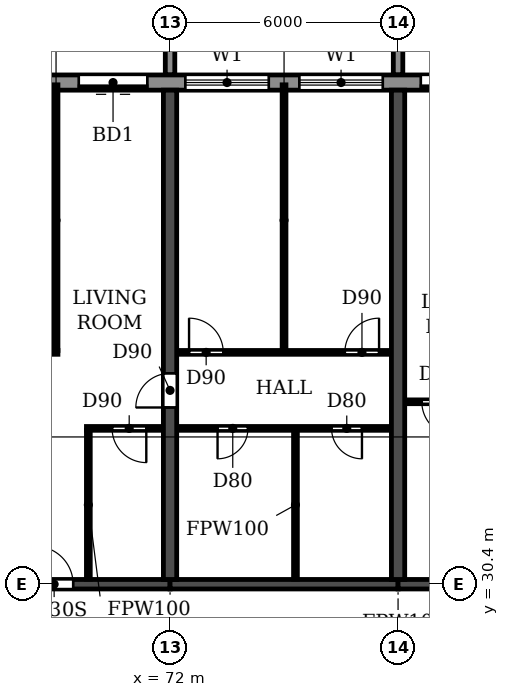
"""IFC4 building model, lengths in metres.
Left out: names, types, materials, properties, quantities, classifications, styles, units other than length and angle.
Written with IfcOpenShell. Run it as: python <this file> out.ifc"""

import sys

from ifc_helpers import new_model, si_unit, direction, frame, frame_2d, origin, place, context, subcontext, project, spatial, polyline, rectangle, outline, extrude, source, transform, mapped, element, fill, save


model = new_model("IFC4")
c1 = context("Model", 3, precision=1e-05, world=origin(), true_north=direction((0.0, 1.0)))
c2 = subcontext(c1, "Body", "Model", "MODEL_VIEW")
j1 = project(units=[si_unit("LENGTHUNIT", "METRE"), si_unit("PLANEANGLEUNIT", "RADIAN")], contexts=[c1])
p1 = place(None, origin())
s1 = spatial("IfcSite", under=j1, at=p1, CompositionType="ELEMENT")
p2 = place(p1, origin())
s2 = spatial("IfcBuilding", under=s1, at=p2, CompositionType="ELEMENT")
p3 = place(p2, frame((0.0, 0.0, 112.5)))
s3 = spatial("IfcBuildingStorey", under=s2, at=p3, CompositionType="ELEMENT", Elevation=112.5)
p4 = place(p3, frame((72.0, 30.525, 0.0), z_axis=(0.0, 0.0, 1.0), x_axis=(0.0, 1.0, 0.0)))
e1 = element("IfcWall", 1, at=p4, inside=s3, PredefinedType="SHEAR", context=c2, shape_type="SweptSolid", body=[
    extrude(rectangle(XDim=12.875, YDim=0.35, at=frame_2d((6.438, 0.0))), origin(), (0.0, 0.0, 1.0), 2.95),
])
p5 = place(p4, frame((4.525, 0.0, 0.0)))
e2 = element("IfcOpeningElement", 2, at=p5, cuts=e1, PredefinedType="OPENING", context=c2, shape_type="SweptSolid", body=[
    extrude(rectangle(XDim=0.9, YDim=2.1, at=frame_2d((0.45, 1.05))), frame((0.0, 0.185, 0.0), z_axis=(0.0, -1.0, 0.0), x_axis=(1.0, 0.0, 0.0)), (0.0, 0.0, 1.0), 0.37),
])
p6 = place(p3, frame((78.0, 30.525, 0.0), z_axis=(0.0, 0.0, 1.0), x_axis=(0.0, 1.0, 0.0)))
e3 = element("IfcWall", 3, at=p6, inside=s3, PredefinedType="SHEAR", context=c2, shape_type="SweptSolid", body=[
    extrude(rectangle(XDim=12.875, YDim=0.35, at=frame_2d((6.438, 0.0))), origin(), (0.0, 0.0, 1.0), 2.95),
])
p7 = place(p3, frame((66.0, 30.4, 0.0), z_axis=(0.0, 0.0, 1.0), x_axis=(1.0, 0.0, 0.0)))
e4 = element("IfcWall", 4, at=p7, inside=s3, PredefinedType="SHEAR", context=c2, shape_type="SweptSolid", body=[
    extrude(rectangle(XDim=6.0, YDim=0.25, at=frame_2d((3.0, 0.0))), origin(), (0.0, 0.0, 1.0), 2.35),
])
p8 = place(p7, frame((2.45, 0.0, 0.0)))
e5 = element("IfcOpeningElement", 5, at=p8, cuts=e4, PredefinedType="OPENING", context=c2, shape_type="SweptSolid", body=[
    extrude(rectangle(XDim=1.0, YDim=2.1, at=frame_2d((0.5, 1.05))), frame((0.0, 0.135, 0.0), z_axis=(0.0, -1.0, 0.0), x_axis=(1.0, 0.0, 0.0)), (0.0, 0.0, 1.0), 0.27),
])
p9 = place(p3, frame((72.0, 30.4, 0.0), z_axis=(0.0, 0.0, 1.0), x_axis=(1.0, 0.0, 0.0)))
e6 = element("IfcWall", 6, at=p9, inside=s3, PredefinedType="SHEAR", context=c2, shape_type="SweptSolid", body=[
    extrude(rectangle(XDim=6.0, YDim=0.25, at=frame_2d((3.0, 0.0))), origin(), (0.0, 0.0, 1.0), 2.35),
])
p10 = place(p3, frame((78.0, 30.4, 0.0), z_axis=(0.0, 0.0, 1.0), x_axis=(1.0, 0.0, 0.0)))
e7 = element("IfcWall", 7, at=p10, inside=s3, PredefinedType="SHEAR", context=c2, shape_type="SweptSolid", body=[
    extrude(rectangle(XDim=6.0, YDim=0.25, at=frame_2d((3.0, 0.0))), origin(), (0.0, 0.0, 1.0), 2.35),
])
p11 = place(p10, frame((2.55, 0.0, 0.0)))
e8 = element("IfcOpeningElement", 8, at=p11, cuts=e7, PredefinedType="OPENING", context=c2, shape_type="SweptSolid", body=[
    extrude(rectangle(XDim=1.0, YDim=2.1, at=frame_2d((0.5, 1.05))), frame((0.0, 0.135, 0.0), z_axis=(0.0, -1.0, 0.0), x_axis=(1.0, 0.0, 0.0)), (0.0, 0.0, 1.0), 0.27),
])
p12 = place(p3, frame((85.317, 43.6, 0.0), z_axis=(0.0, 0.0, 1.0), x_axis=(-1.0, 0.0, 0.0)))
e9 = element("IfcWall", 9, at=p12, inside=s3, PredefinedType="STANDARD", context=c2, shape_type="SweptSolid", body=[
    extrude(rectangle(XDim=68.634, YDim=0.4, at=frame_2d((34.317, 0.0))), origin(), (0.0, 0.0, 1.0), 2.95),
])
p13 = place(p12, frame((64.917, 0.0, 0.0)))
e10 = element("IfcOpeningElement", 10, at=p13, cuts=e9, PredefinedType="OPENING", context=c2, shape_type="SweptSolid", body=[
    extrude(rectangle(XDim=1.8, YDim=2.4, at=frame_2d((0.9, 1.2))), frame((0.0, 0.21, 0.0), z_axis=(0.0, -1.0, 0.0), x_axis=(1.0, 0.0, 0.0)), (0.0, 0.0, 1.0), 0.42),
])
p14 = place(p12, frame((61.717, 0.0, 0.9)))
e11 = element("IfcOpeningElement", 11, at=p14, cuts=e9, PredefinedType="OPENING", context=c2, shape_type="SweptSolid", body=[
    extrude(rectangle(XDim=2.2, YDim=1.5, at=frame_2d((1.1, 0.75))), frame((0.0, 0.21, 0.0), z_axis=(0.0, -1.0, 0.0), x_axis=(1.0, 0.0, 0.0)), (0.0, 0.0, 1.0), 0.42),
])
p15 = place(p12, frame((58.717, 0.0, 0.9)))
e12 = element("IfcOpeningElement", 12, at=p15, cuts=e9, PredefinedType="OPENING", context=c2, shape_type="SweptSolid", body=[
    extrude(rectangle(XDim=2.2, YDim=1.5, at=frame_2d((1.1, 0.75))), frame((0.0, 0.21, 0.0), z_axis=(0.0, -1.0, 0.0), x_axis=(1.0, 0.0, 0.0)), (0.0, 0.0, 1.0), 0.42),
])
p16 = place(p12, frame((55.917, 0.0, 0.0)))
e13 = element("IfcOpeningElement", 13, at=p16, cuts=e9, PredefinedType="OPENING", context=c2, shape_type="SweptSolid", body=[
    extrude(rectangle(XDim=1.8, YDim=2.4, at=frame_2d((0.9, 1.2))), frame((0.0, 0.21, 0.0), z_axis=(0.0, -1.0, 0.0), x_axis=(1.0, 0.0, 0.0)), (0.0, 0.0, 1.0), 0.42),
])
p17 = place(p12, frame((52.917, 0.0, 0.0)))
e14 = element("IfcOpeningElement", 14, at=p17, cuts=e9, PredefinedType="OPENING", context=c2, shape_type="SweptSolid", body=[
    extrude(rectangle(XDim=1.8, YDim=2.4, at=frame_2d((0.9, 1.2))), frame((0.0, 0.21, 0.0), z_axis=(0.0, -1.0, 0.0), x_axis=(1.0, 0.0, 0.0)), (0.0, 0.0, 1.0), 0.42),
])
p18 = place(p12, frame((49.717, 0.0, 0.9)))
e15 = element("IfcOpeningElement", 15, at=p18, cuts=e9, PredefinedType="OPENING", context=c2, shape_type="SweptSolid", body=[
    extrude(rectangle(XDim=2.2, YDim=1.5, at=frame_2d((1.1, 0.75))), frame((0.0, 0.21, 0.0), z_axis=(0.0, -1.0, 0.0), x_axis=(1.0, 0.0, 0.0)), (0.0, 0.0, 1.0), 0.42),
])
p19 = place(p12, frame((46.717, 0.0, 0.9)))
e16 = element("IfcOpeningElement", 16, at=p19, cuts=e9, PredefinedType="OPENING", context=c2, shape_type="SweptSolid", body=[
    extrude(rectangle(XDim=2.2, YDim=1.5, at=frame_2d((1.1, 0.75))), frame((0.0, 0.21, 0.0), z_axis=(0.0, -1.0, 0.0), x_axis=(1.0, 0.0, 0.0)), (0.0, 0.0, 1.0), 0.42),
])
p20 = place(p12, frame((43.917, 0.0, 0.0)))
e17 = element("IfcOpeningElement", 17, at=p20, cuts=e9, PredefinedType="OPENING", context=c2, shape_type="SweptSolid", body=[
    extrude(rectangle(XDim=1.8, YDim=2.4, at=frame_2d((0.9, 1.2))), frame((0.0, 0.21, 0.0), z_axis=(0.0, -1.0, 0.0), x_axis=(1.0, 0.0, 0.0)), (0.0, 0.0, 1.0), 0.42),
])
p21 = place(p12, frame((40.717, 0.0, 0.9)))
e18 = element("IfcOpeningElement", 18, at=p21, cuts=e9, PredefinedType="OPENING", context=c2, shape_type="SweptSolid", body=[
    extrude(rectangle(XDim=2.2, YDim=1.5, at=frame_2d((1.1, 0.75))), frame((0.0, 0.21, 0.0), z_axis=(0.0, -1.0, 0.0), x_axis=(1.0, 0.0, 0.0)), (0.0, 0.0, 1.0), 0.42),
])
p22 = place(p12, frame((37.717, 0.0, 0.9)))
e19 = element("IfcOpeningElement", 19, at=p22, cuts=e9, PredefinedType="OPENING", context=c2, shape_type="SweptSolid", body=[
    extrude(rectangle(XDim=2.2, YDim=1.5, at=frame_2d((1.1, 0.75))), frame((0.0, 0.21, 0.0), z_axis=(0.0, -1.0, 0.0), x_axis=(1.0, 0.0, 0.0)), (0.0, 0.0, 1.0), 0.42),
])
p23 = place(p12, frame((34.917, 0.0, 0.0)))
e20 = element("IfcOpeningElement", 20, at=p23, cuts=e9, PredefinedType="OPENING", context=c2, shape_type="SweptSolid", body=[
    extrude(rectangle(XDim=1.8, YDim=2.4, at=frame_2d((0.9, 1.2))), frame((0.0, 0.21, 0.0), z_axis=(0.0, -1.0, 0.0), x_axis=(1.0, 0.0, 0.0)), (0.0, 0.0, 1.0), 0.42),
])
p24 = place(p12, frame((31.717, 0.0, 0.9)))
e21 = element("IfcOpeningElement", 21, at=p24, cuts=e9, PredefinedType="OPENING", context=c2, shape_type="SweptSolid", body=[
    extrude(rectangle(XDim=2.2, YDim=1.5, at=frame_2d((1.1, 0.75))), frame((0.0, 0.21, 0.0), z_axis=(0.0, -1.0, 0.0), x_axis=(1.0, 0.0, 0.0)), (0.0, 0.0, 1.0), 0.42),
])
p25 = place(p12, frame((28.917, 0.0, 0.0)))
e22 = element("IfcOpeningElement", 22, at=p25, cuts=e9, PredefinedType="OPENING", context=c2, shape_type="SweptSolid", body=[
    extrude(rectangle(XDim=1.8, YDim=2.4, at=frame_2d((0.9, 1.2))), frame((0.0, 0.21, 0.0), z_axis=(0.0, -1.0, 0.0), x_axis=(1.0, 0.0, 0.0)), (0.0, 0.0, 1.0), 0.42),
])
p26 = place(p12, frame((25.717, 0.0, 0.9)))
e23 = element("IfcOpeningElement", 23, at=p26, cuts=e9, PredefinedType="OPENING", context=c2, shape_type="SweptSolid", body=[
    extrude(rectangle(XDim=2.2, YDim=1.5, at=frame_2d((1.1, 0.75))), frame((0.0, 0.21, 0.0), z_axis=(0.0, -1.0, 0.0), x_axis=(1.0, 0.0, 0.0)), (0.0, 0.0, 1.0), 0.42),
])
p27 = place(p12, frame((22.717, 0.0, 0.9)))
e24 = element("IfcOpeningElement", 24, at=p27, cuts=e9, PredefinedType="OPENING", context=c2, shape_type="SweptSolid", body=[
    extrude(rectangle(XDim=2.2, YDim=1.5, at=frame_2d((1.1, 0.75))), frame((0.0, 0.21, 0.0), z_axis=(0.0, -1.0, 0.0), x_axis=(1.0, 0.0, 0.0)), (0.0, 0.0, 1.0), 0.42),
])
p28 = place(p12, frame((19.917, 0.0, 0.0)))
e25 = element("IfcOpeningElement", 25, at=p28, cuts=e9, PredefinedType="OPENING", context=c2, shape_type="SweptSolid", body=[
    extrude(rectangle(XDim=1.8, YDim=2.4, at=frame_2d((0.9, 1.2))), frame((0.0, 0.21, 0.0), z_axis=(0.0, -1.0, 0.0), x_axis=(1.0, 0.0, 0.0)), (0.0, 0.0, 1.0), 0.42),
])
p29 = place(p12, frame((16.717, 0.0, 0.9)))
e26 = element("IfcOpeningElement", 26, at=p29, cuts=e9, PredefinedType="OPENING", context=c2, shape_type="SweptSolid", body=[
    extrude(rectangle(XDim=2.2, YDim=1.5, at=frame_2d((1.1, 0.75))), frame((0.0, 0.21, 0.0), z_axis=(0.0, -1.0, 0.0), x_axis=(1.0, 0.0, 0.0)), (0.0, 0.0, 1.0), 0.42),
])
p30 = place(p12, frame((13.917, 0.0, 0.0)))
e27 = element("IfcOpeningElement", 27, at=p30, cuts=e9, PredefinedType="OPENING", context=c2, shape_type="SweptSolid", body=[
    extrude(rectangle(XDim=1.8, YDim=2.4, at=frame_2d((0.9, 1.2))), frame((0.0, 0.21, 0.0), z_axis=(0.0, -1.0, 0.0), x_axis=(1.0, 0.0, 0.0)), (0.0, 0.0, 1.0), 0.42),
])
p31 = place(p12, frame((10.717, 0.0, 0.9)))
e28 = element("IfcOpeningElement", 28, at=p31, cuts=e9, PredefinedType="OPENING", context=c2, shape_type="SweptSolid", body=[
    extrude(rectangle(XDim=2.2, YDim=1.5, at=frame_2d((1.1, 0.75))), frame((0.0, 0.21, 0.0), z_axis=(0.0, -1.0, 0.0), x_axis=(1.0, 0.0, 0.0)), (0.0, 0.0, 1.0), 0.42),
])
p32 = place(p12, frame((7.717, 0.0, 0.9)))
e29 = element("IfcOpeningElement", 29, at=p32, cuts=e9, PredefinedType="OPENING", context=c2, shape_type="SweptSolid", body=[
    extrude(rectangle(XDim=2.2, YDim=1.5, at=frame_2d((1.1, 0.75))), frame((0.0, 0.21, 0.0), z_axis=(0.0, -1.0, 0.0), x_axis=(1.0, 0.0, 0.0)), (0.0, 0.0, 1.0), 0.42),
])
p33 = place(p12, frame((4.917, 0.0, 0.0)))
e30 = element("IfcOpeningElement", 30, at=p33, cuts=e9, PredefinedType="OPENING", context=c2, shape_type="SweptSolid", body=[
    extrude(rectangle(XDim=1.8, YDim=2.4, at=frame_2d((0.9, 1.2))), frame((0.0, 0.21, 0.0), z_axis=(0.0, -1.0, 0.0), x_axis=(1.0, 0.0, 0.0)), (0.0, 0.0, 1.0), 0.42),
])
p34 = place(p12, frame((1.717, 0.0, 0.9)))
e31 = element("IfcOpeningElement", 31, at=p34, cuts=e9, PredefinedType="OPENING", context=c2, shape_type="SweptSolid", body=[
    extrude(rectangle(XDim=2.2, YDim=1.5, at=frame_2d((1.1, 0.75))), frame((0.0, 0.21, 0.0), z_axis=(0.0, -1.0, 0.0), x_axis=(1.0, 0.0, 0.0)), (0.0, 0.0, 1.0), 0.42),
])
m1 = source(origin(), c2, "Body", "SweptSolid", [
    extrude(outline(polyline([(0.0, 0.0), (0.25, 0.0), (0.25, 3.1), (0.0, 3.1), (0.0, 0.0)])), origin(), (0.0, 0.0, 1.0), 3.1),
])
for number, where in (
    (32, (71.875, 43.8, 0.0)),
    (33, (77.875, 43.8, 0.0)),
):
    element("IfcWall", number, at=place(p3, frame(where)), inside=s3, PredefinedType="STANDARD", context=c2, shape_type="MappedRepresentation", body=[
        mapped(m1, transform((0.0, 0.0, 0.0))),
    ])
p35 = place(p3, frame((69.8, 34.5, 0.0), z_axis=(0.0, 0.0, 1.0), x_axis=(1.0, 0.0, 0.0)))
e34 = element("IfcWall", 34, at=p35, inside=s3, PredefinedType="PARTITIONING", context=c2, shape_type="SweptSolid", body=[
    extrude(rectangle(XDim=2.015, YDim=0.1, at=frame_2d((1.007, 0.0))), origin(), (0.0, 0.0, 1.0), 2.95),
])
p36 = place(p35, frame((0.675, 0.0, 0.0)))
e35 = element("IfcOpeningElement", 35, at=p36, cuts=e34, PredefinedType="OPENING", context=c2, shape_type="SweptSolid", body=[
    extrude(rectangle(XDim=0.9, YDim=2.1, at=frame_2d((0.45, 1.05))), frame((0.0, 0.06, 0.0), z_axis=(0.0, -1.0, 0.0), x_axis=(1.0, 0.0, 0.0)), (0.0, 0.0, 1.0), 0.12),
])
p37 = place(p3, frame((72.185, 34.5, 0.0), z_axis=(0.0, 0.0, 1.0), x_axis=(1.0, 0.0, 0.0)))
e36 = element("IfcWall", 36, at=p37, inside=s3, PredefinedType="PARTITIONING", context=c2, shape_type="SweptSolid", body=[
    extrude(rectangle(XDim=5.63, YDim=0.1, at=frame_2d((2.815, 0.0))), origin(), (0.0, 0.0, 1.0), 2.95),
])
p38 = place(p37, frame((1.065, 0.0, 0.0)))
e37 = element("IfcOpeningElement", 37, at=p38, cuts=e36, PredefinedType="OPENING", context=c2, shape_type="SweptSolid", body=[
    extrude(rectangle(XDim=0.8, YDim=2.1, at=frame_2d((0.4, 1.05))), frame((0.0, 0.06, 0.0), z_axis=(0.0, -1.0, 0.0), x_axis=(1.0, 0.0, 0.0)), (0.0, 0.0, 1.0), 0.12),
])
p39 = place(p37, frame((4.065, 0.0, 0.0)))
e38 = element("IfcOpeningElement", 38, at=p39, cuts=e36, PredefinedType="OPENING", context=c2, shape_type="SweptSolid", body=[
    extrude(rectangle(XDim=0.8, YDim=2.1, at=frame_2d((0.4, 1.05))), frame((0.0, 0.06, 0.0), z_axis=(0.0, -1.0, 0.0), x_axis=(1.0, 0.0, 0.0)), (0.0, 0.0, 1.0), 0.12),
])
p40 = place(p3, frame((78.185, 35.2, 0.0), z_axis=(0.0, 0.0, 1.0), x_axis=(1.0, 0.0, 0.0)))
e39 = element("IfcWall", 39, at=p40, inside=s3, PredefinedType="PARTITIONING", context=c2, shape_type="SweptSolid", body=[
    extrude(rectangle(XDim=2.015, YDim=0.1, at=frame_2d((1.007, 0.0))), origin(), (0.0, 0.0, 1.0), 2.95),
])
p41 = place(p40, frame((0.44, 0.0, 0.0)))
e40 = element("IfcOpeningElement", 40, at=p41, cuts=e39, PredefinedType="OPENING", context=c2, shape_type="SweptSolid", body=[
    extrude(rectangle(XDim=0.9, YDim=2.1, at=frame_2d((0.45, 1.05))), frame((0.0, 0.06, 0.0), z_axis=(0.0, -1.0, 0.0), x_axis=(1.0, 0.0, 0.0)), (0.0, 0.0, 1.0), 0.12),
])
p42 = place(p3, frame((66.185, 36.5, 0.0), z_axis=(0.0, 0.0, 1.0), x_axis=(1.0, 0.0, 0.0)))
e41 = element("IfcWall", 41, at=p42, inside=s3, PredefinedType="PARTITIONING", context=c2, shape_type="SweptSolid", body=[
    extrude(rectangle(XDim=2.865, YDim=0.1, at=frame_2d((1.433, 0.0))), origin(), (0.0, 0.0, 1.0), 2.95),
])
p43 = place(p42, frame((0.315, 0.0, 0.0)))
e42 = element("IfcOpeningElement", 42, at=p43, cuts=e41, PredefinedType="OPENING", context=c2, shape_type="SweptSolid", body=[
    extrude(rectangle(XDim=0.9, YDim=2.1, at=frame_2d((0.45, 1.05))), frame((0.0, 0.06, 0.0), z_axis=(0.0, -1.0, 0.0), x_axis=(1.0, 0.0, 0.0)), (0.0, 0.0, 1.0), 0.12),
])
p44 = place(p3, frame((72.185, 36.5, 0.0), z_axis=(0.0, 0.0, 1.0), x_axis=(1.0, 0.0, 0.0)))
e43 = element("IfcWall", 43, at=p44, inside=s3, PredefinedType="PARTITIONING", context=c2, shape_type="SweptSolid", body=[
    extrude(rectangle(XDim=5.63, YDim=0.1, at=frame_2d((2.815, 0.0))), origin(), (0.0, 0.0, 1.0), 2.95),
])
p45 = place(p44, frame((0.315, 0.0, 0.0)))
e44 = element("IfcOpeningElement", 44, at=p45, cuts=e43, PredefinedType="OPENING", context=c2, shape_type="SweptSolid", body=[
    extrude(rectangle(XDim=0.9, YDim=2.1, at=frame_2d((0.45, 1.05))), frame((0.0, 0.06, 0.0), z_axis=(0.0, -1.0, 0.0), x_axis=(1.0, 0.0, 0.0)), (0.0, 0.0, 1.0), 0.12),
])
p46 = place(p44, frame((4.415, 0.0, 0.0)))
e45 = element("IfcOpeningElement", 45, at=p46, cuts=e43, PredefinedType="OPENING", context=c2, shape_type="SweptSolid", body=[
    extrude(rectangle(XDim=0.9, YDim=2.1, at=frame_2d((0.45, 1.05))), frame((0.0, 0.06, 0.0), z_axis=(0.0, -1.0, 0.0), x_axis=(1.0, 0.0, 0.0)), (0.0, 0.0, 1.0), 0.12),
])
p47 = place(p3, frame((69.0, 36.55, 0.0), z_axis=(0.0, 0.0, 1.0), x_axis=(0.0, 1.0, 0.0)))
e46 = element("IfcWall", 46, at=p47, inside=s3, PredefinedType="PARTITIONING", context=c2, shape_type="SweptSolid", body=[
    extrude(rectangle(XDim=6.99, YDim=0.1, at=frame_2d((3.495, 0.0))), origin(), (0.0, 0.0, 1.0), 2.95),
])
p48 = place(p3, frame((69.85, 30.535, 0.0), z_axis=(0.0, 0.0, 1.0), x_axis=(0.0, 1.0, 0.0)))
e47 = element("IfcWall", 47, at=p48, inside=s3, PredefinedType="PARTITIONING", context=c2, shape_type="SweptSolid", body=[
    extrude(rectangle(XDim=3.915, YDim=0.1, at=frame_2d((1.958, 0.0))), origin(), (0.0, 0.0, 1.0), 2.95),
])
p49 = place(p3, frame((75.0, 36.55, 0.0), z_axis=(0.0, 0.0, 1.0), x_axis=(0.0, 1.0, 0.0)))
e48 = element("IfcWall", 48, at=p49, inside=s3, PredefinedType="PARTITIONING", context=c2, shape_type="SweptSolid", body=[
    extrude(rectangle(XDim=6.99, YDim=0.1, at=frame_2d((3.495, 0.0))), origin(), (0.0, 0.0, 1.0), 2.95),
])
p50 = place(p3, frame((75.3, 30.535, 0.0), z_axis=(0.0, 0.0, 1.0), x_axis=(0.0, 1.0, 0.0)))
e49 = element("IfcWall", 49, at=p50, inside=s3, PredefinedType="PARTITIONING", context=c2, shape_type="SweptSolid", body=[
    extrude(rectangle(XDim=3.915, YDim=0.1, at=frame_2d((1.958, 0.0))), origin(), (0.0, 0.0, 1.0), 2.95),
])
p51 = place(p30, origin())
e50 = element("IfcDoor", 50, at=p51, inside=s3, OperationType="DOUBLE_DOOR_SLIDING", PredefinedType="DOOR", context=c2, shape_type="SweptSolid", body=[
    extrude(rectangle(XDim=1.8, YDim=2.4, at=frame_2d((0.9, 1.2))), frame((0.0, 0.025, 0.0), z_axis=(0.0, -1.0, 0.0), x_axis=(1.0, 0.0, 0.0)), (0.0, 0.0, 1.0), 0.05),
])
fill(e27, e50)
p52 = place(p31, origin())
e51 = element("IfcWindow", 51, at=p52, inside=s3, PartitioningType="DOUBLE_PANEL_HORIZONTAL", PredefinedType="WINDOW", context=c2, shape_type="SweptSolid", body=[
    extrude(rectangle(XDim=2.2, YDim=1.5, at=frame_2d((1.1, 0.75))), frame((0.0, 0.03, 0.0), z_axis=(0.0, -1.0, 0.0), x_axis=(1.0, 0.0, 0.0)), (0.0, 0.0, 1.0), 0.06),
])
fill(e28, e51)
p53 = place(p32, origin())
e52 = element("IfcWindow", 52, at=p53, inside=s3, PartitioningType="DOUBLE_PANEL_HORIZONTAL", PredefinedType="WINDOW", context=c2, shape_type="SweptSolid", body=[
    extrude(rectangle(XDim=2.2, YDim=1.5, at=frame_2d((1.1, 0.75))), frame((0.0, 0.03, 0.0), z_axis=(0.0, -1.0, 0.0), x_axis=(1.0, 0.0, 0.0)), (0.0, 0.0, 1.0), 0.06),
])
fill(e29, e52)
p54 = place(p33, origin())
e53 = element("IfcDoor", 53, at=p54, inside=s3, OperationType="DOUBLE_DOOR_SLIDING", PredefinedType="DOOR", context=c2, shape_type="SweptSolid", body=[
    extrude(rectangle(XDim=1.8, YDim=2.4, at=frame_2d((0.9, 1.2))), frame((0.0, 0.025, 0.0), z_axis=(0.0, -1.0, 0.0), x_axis=(1.0, 0.0, 0.0)), (0.0, 0.0, 1.0), 0.05),
])
fill(e30, e53)
p55 = place(p45, origin())
e54 = element("IfcDoor", 54, at=p55, inside=s3, OperationType="SINGLE_SWING_LEFT", PredefinedType="DOOR", context=c2, shape_type="SweptSolid", body=[
    extrude(rectangle(XDim=0.9, YDim=2.1, at=frame_2d((0.45, 1.05))), frame((0.0, 0.025, 0.0), z_axis=(0.0, -1.0, 0.0), x_axis=(1.0, 0.0, 0.0)), (0.0, 0.0, 1.0), 0.05),
])
fill(e44, e54)
p56 = place(p38, frame((0.8, 0.0, 0.0), z_axis=(0.0, 0.0, 1.0), x_axis=(-1.0, 0.0, 0.0)))
e55 = element("IfcDoor", 55, at=p56, inside=s3, OperationType="SINGLE_SWING_RIGHT", PredefinedType="DOOR", context=c2, shape_type="SweptSolid", body=[
    extrude(rectangle(XDim=0.8, YDim=2.1, at=frame_2d((0.4, 1.05))), frame((0.0, 0.025, 0.0), z_axis=(0.0, -1.0, 0.0), x_axis=(1.0, 0.0, 0.0)), (0.0, 0.0, 1.0), 0.05),
])
fill(e37, e55)
p57 = place(p39, frame((0.8, 0.0, 0.0), z_axis=(0.0, 0.0, 1.0), x_axis=(-1.0, 0.0, 0.0)))
e56 = element("IfcDoor", 56, at=p57, inside=s3, OperationType="SINGLE_SWING_LEFT", PredefinedType="DOOR", context=c2, shape_type="SweptSolid", body=[
    extrude(rectangle(XDim=0.8, YDim=2.1, at=frame_2d((0.4, 1.05))), frame((0.0, 0.025, 0.0), z_axis=(0.0, -1.0, 0.0), x_axis=(1.0, 0.0, 0.0)), (0.0, 0.0, 1.0), 0.05),
])
fill(e38, e56)
p58 = place(p46, origin())
e57 = element("IfcDoor", 57, at=p58, inside=s3, OperationType="SINGLE_SWING_RIGHT", PredefinedType="DOOR", context=c2, shape_type="SweptSolid", body=[
    extrude(rectangle(XDim=0.9, YDim=2.1, at=frame_2d((0.45, 1.05))), frame((0.0, 0.025, 0.0), z_axis=(0.0, -1.0, 0.0), x_axis=(1.0, 0.0, 0.0)), (0.0, 0.0, 1.0), 0.05),
])
fill(e45, e57)
p59 = place(p8, origin())
e58 = element("IfcDoor", 58, at=p59, inside=s3, OperationType="SINGLE_SWING_LEFT", PredefinedType="DOOR", context=c2, shape_type="SweptSolid", body=[
    extrude(rectangle(XDim=1.0, YDim=2.1, at=frame_2d((0.5, 1.05))), frame((0.0, 0.025, 0.0), z_axis=(0.0, -1.0, 0.0), x_axis=(1.0, 0.0, 0.0)), (0.0, 0.0, 1.0), 0.05),
])
fill(e5, e58)
p60 = place(p36, frame((0.9, 0.0, 0.0), z_axis=(0.0, 0.0, 1.0), x_axis=(-1.0, 0.0, 0.0)))
e59 = element("IfcDoor", 59, at=p60, inside=s3, OperationType="SINGLE_SWING_LEFT", PredefinedType="DOOR", context=c2, shape_type="SweptSolid", body=[
    extrude(rectangle(XDim=0.9, YDim=2.1, at=frame_2d((0.45, 1.05))), frame((0.0, 0.025, 0.0), z_axis=(0.0, -1.0, 0.0), x_axis=(1.0, 0.0, 0.0)), (0.0, 0.0, 1.0), 0.05),
])
fill(e35, e59)
p61 = place(p5, origin())
e60 = element("IfcDoor", 60, at=p61, inside=s3, OperationType="SINGLE_SWING_LEFT", PredefinedType="DOOR", context=c2, shape_type="SweptSolid", body=[
    extrude(rectangle(XDim=0.9, YDim=2.1, at=frame_2d((0.45, 1.05))), frame((0.0, 0.025, 0.0), z_axis=(0.0, -1.0, 0.0), x_axis=(1.0, 0.0, 0.0)), (0.0, 0.0, 1.0), 0.05),
])
fill(e2, e60)
p62 = place(p41, frame((0.9, 0.0, 0.0), z_axis=(0.0, 0.0, 1.0), x_axis=(-1.0, 0.0, 0.0)))
e61 = element("IfcDoor", 61, at=p62, inside=s3, OperationType="SINGLE_SWING_LEFT", PredefinedType="DOOR", context=c2, shape_type="SweptSolid", body=[
    extrude(rectangle(XDim=0.9, YDim=2.1, at=frame_2d((0.45, 1.05))), frame((0.0, 0.025, 0.0), z_axis=(0.0, -1.0, 0.0), x_axis=(1.0, 0.0, 0.0)), (0.0, 0.0, 1.0), 0.05),
])
fill(e40, e61)
save(model, sys.argv[1])
